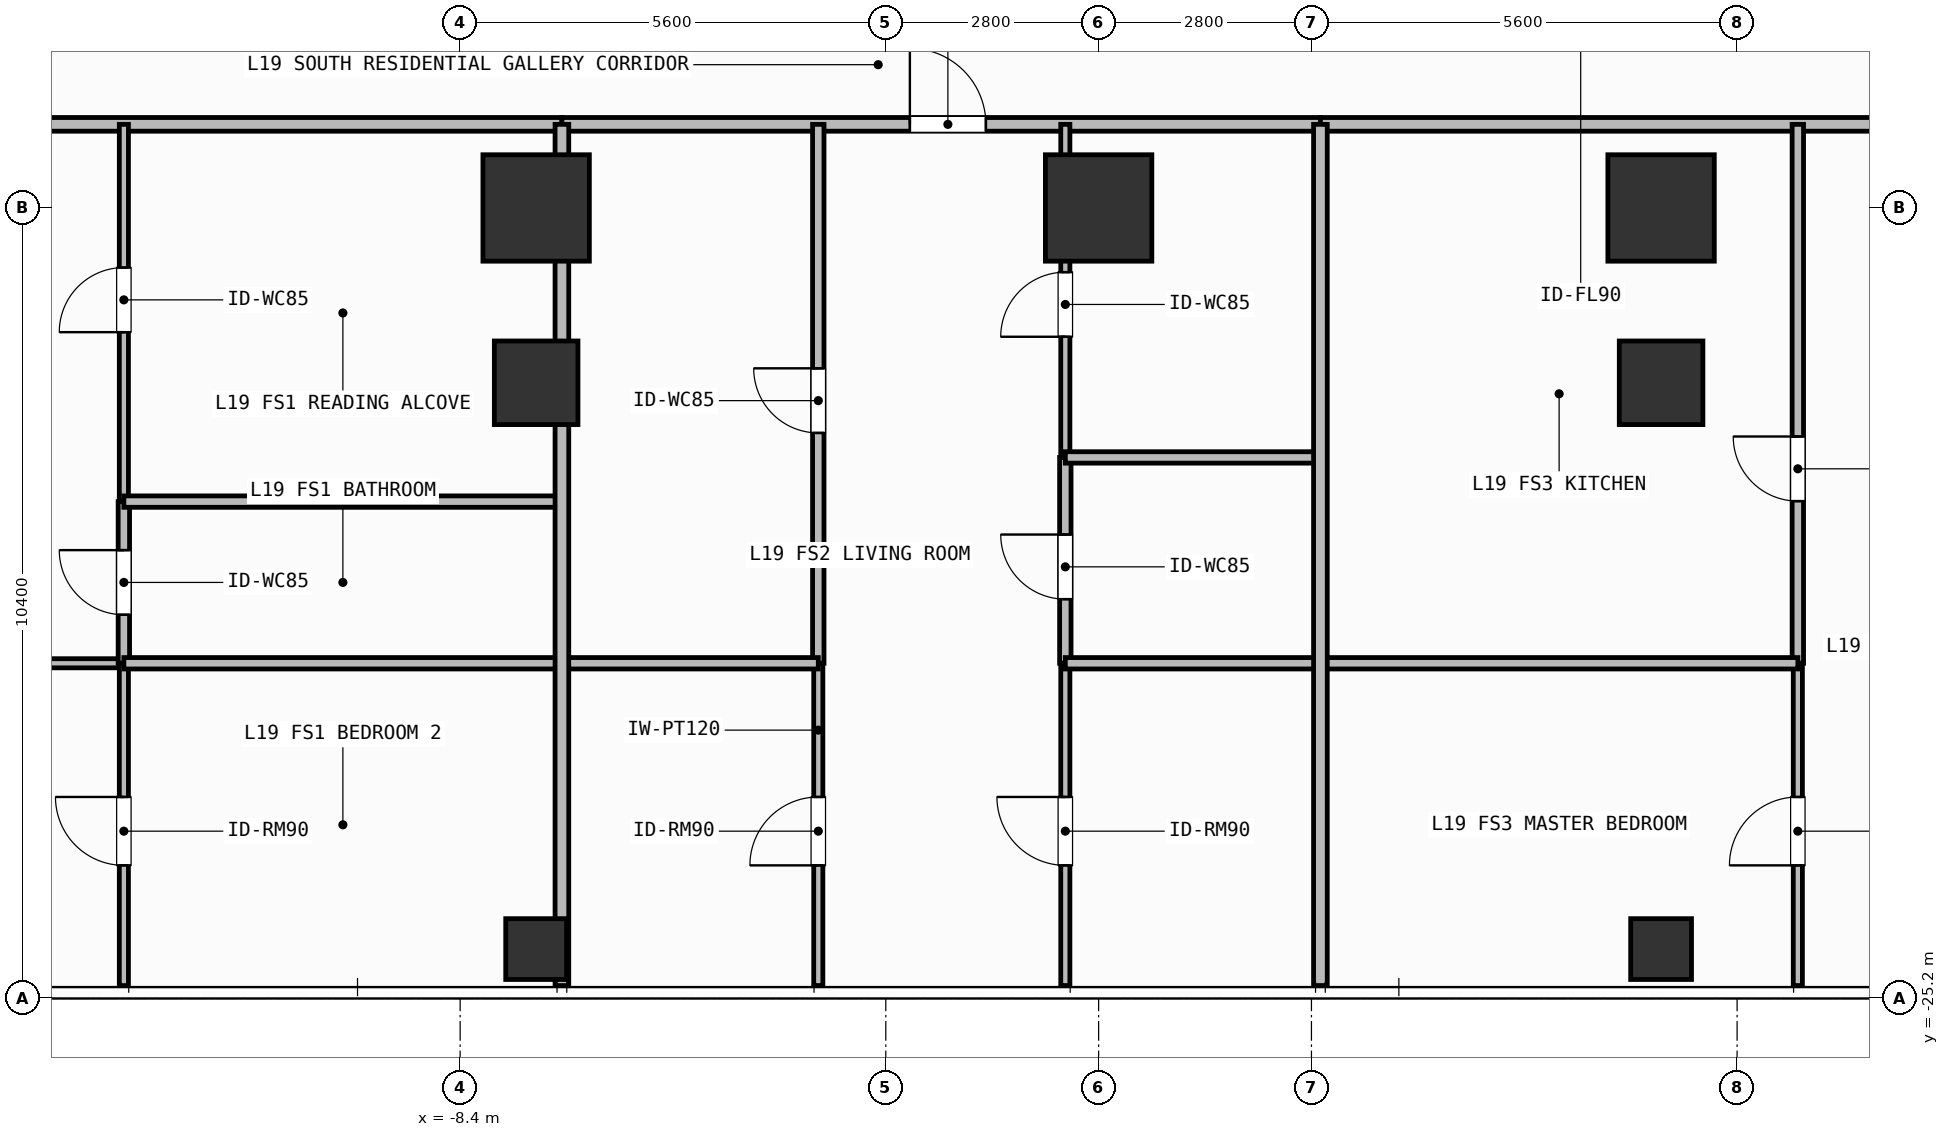
"""IFC4 building model, lengths in metres.
Left out: names, types, materials, properties, quantities, classifications, styles, units other than length and angle.
Written with IfcOpenShell. Run it as: python <this file> out.ifc"""

import sys

from ifc_helpers import new_model, si_unit, direction, frame, frame_2d, origin, origin_2d, place, context, subcontext, project, spatial, rectangle, hollow_rectangle, extrude, element, fill, save


model = new_model("IFC4")
c1 = context("Model", 3, precision=1e-05, world=origin(), true_north=direction((0.0, 1.0)))
c2 = subcontext(c1, "Body", "Model", "MODEL_VIEW")
j1 = project(units=[si_unit("LENGTHUNIT", "METRE"), si_unit("PLANEANGLEUNIT", "RADIAN")], contexts=[c1])
p1 = place(None, origin())
s1 = spatial("IfcSite", under=j1, at=p1, CompositionType="ELEMENT")
p2 = place(p1, origin())
s2 = spatial("IfcBuilding", under=s1, at=p2, CompositionType="ELEMENT")
p3 = place(p2, frame((0.0, 0.0, 73.5)))
s3 = spatial("IfcBuildingStorey", under=s2, at=p3, CompositionType="ELEMENT", Elevation=73.5)
for number, where, z_axis, x_axis in (
    (1, (-7.4, -14.8, 0.0), (0.0, 0.0, 1.0), (1.0, 0.0, 0.0)),
    (2, (0.0, -14.8, 0.0), (0.0, 0.0, 1.0), (1.0, 0.0, 0.0)),
    (3, (7.4, -14.8, 0.0), (0.0, 0.0, 1.0), (1.0, 0.0, 0.0)),
):
    element("IfcColumn", number, at=place(p3, frame(where, z_axis=z_axis, x_axis=x_axis)), inside=s3, PredefinedType="COLUMN", context=c2, shape_type="SweptSolid", body=[
        extrude(rectangle(XDim=1.4, YDim=1.4, at=origin_2d()), origin(), (0.0, 0.0, 1.0), 3.9),
    ])
for number, where, z_axis, x_axis in (
    (4, (-7.4, -17.1, 0.0), (0.0, 0.0, 1.0), (1.0, 0.0, 0.0)),
    (5, (7.4, -17.1, 0.0), (0.0, 0.0, 1.0), (1.0, 0.0, 0.0)),
):
    element("IfcColumn", number, at=place(p3, frame(where, z_axis=z_axis, x_axis=x_axis)), inside=s3, PredefinedType="COLUMN", context=c2, shape_type="SweptSolid", body=[
        extrude(rectangle(XDim=1.1, YDim=1.1, at=origin_2d()), origin(), (0.0, 0.0, 1.0), 3.9),
    ])
for number, where, z_axis, x_axis in (
    (6, (-7.4, -24.55, 0.0), (0.0, 0.0, 1.0), (1.0, 0.0, 0.0)),
    (7, (7.4, -24.55, 0.0), (0.0, 0.0, 1.0), (1.0, 0.0, 0.0)),
):
    element("IfcColumn", number, at=place(p3, frame(where, z_axis=z_axis, x_axis=x_axis)), inside=s3, PredefinedType="COLUMN", context=c2, shape_type="SweptSolid", body=[
        extrude(hollow_rectangle(XDim=0.8, YDim=0.8, WallThickness=0.036, at=origin_2d()), origin(), (0.0, 0.0, 1.0), 3.9),
    ])
p4 = place(p3, frame((-24.42, -13.7, 0.0), z_axis=(0.0, 0.0, 1.0), x_axis=(1.0, 0.0, 0.0)))
e8 = element("IfcWall", 8, at=p4, inside=s3, PredefinedType="PARTITIONING", context=c2, shape_type="SweptSolid", body=[
    extrude(rectangle(XDim=17.359, YDim=0.18, at=frame_2d((8.679, 0.0))), origin(), (0.0, 0.0, 1.0), 3.6),
])
p5 = place(p4, frame((7.288, 0.0, 0.0)))
e9 = element("IfcOpeningElement", 9, at=p5, cuts=e8, PredefinedType="OPENING", context=c2, shape_type="SweptSolid", body=[
    extrude(rectangle(XDim=1.0, YDim=2.2, at=frame_2d((0.5, 1.1))), frame((0.0, 0.1, 0.0), z_axis=(0.0, -1.0, 0.0), x_axis=(1.0, 0.0, 0.0)), (0.0, 0.0, 1.0), 0.2),
])
p6 = place(p3, frame((-20.783, -20.79, 0.0), z_axis=(0.0, 0.0, 1.0), x_axis=(1.0, 0.0, 0.0)))
e10 = element("IfcWall", 10, at=p6, inside=s3, PredefinedType="PARTITIONING", context=c2, shape_type="SweptSolid", body=[
    extrude(rectangle(XDim=7.959, YDim=0.12, at=frame_2d((3.979, 0.0))), origin(), (0.0, 0.0, 1.0), 3.6),
])
p7 = place(p6, frame((3.53, 0.0, 0.0)))
e11 = element("IfcOpeningElement", 11, at=p7, cuts=e10, PredefinedType="OPENING", context=c2, shape_type="SweptSolid", body=[
    extrude(rectangle(XDim=0.9, YDim=2.1, at=frame_2d((0.45, 1.05))), frame((0.0, 0.07, 0.0), z_axis=(0.0, -1.0, 0.0), x_axis=(1.0, 0.0, 0.0)), (0.0, 0.0, 1.0), 0.14),
])
p8 = place(p3, frame((-12.824, -20.79, 0.0), z_axis=(0.0, 0.0, 1.0), x_axis=(0.0, 1.0, 0.0)))
e12 = element("IfcWall", 12, at=p8, inside=s3, PredefinedType="PARTITIONING", context=c2, shape_type="SweptSolid", body=[
    extrude(rectangle(XDim=2.127, YDim=0.15, at=frame_2d((1.063, 0.0))), origin(), (0.0, 0.0, 1.0), 3.6),
])
p9 = place(p8, frame((0.638, 0.0, 0.0)))
e13 = element("IfcOpeningElement", 13, at=p9, cuts=e12, PredefinedType="OPENING", context=c2, shape_type="SweptSolid", body=[
    extrude(rectangle(XDim=0.85, YDim=2.1, at=frame_2d((0.425, 1.05))), frame((0.0, 0.085, 0.0), z_axis=(0.0, -1.0, 0.0), x_axis=(1.0, 0.0, 0.0)), (0.0, 0.0, 1.0), 0.17),
])
p10 = place(p3, frame((-12.824, -18.663, 0.0), z_axis=(0.0, 0.0, 1.0), x_axis=(0.0, 1.0, 0.0)))
e14 = element("IfcWall", 14, at=p10, inside=s3, PredefinedType="PARTITIONING", context=c2, shape_type="SweptSolid", body=[
    extrude(rectangle(XDim=4.963, YDim=0.12, at=frame_2d((2.481, 0.0))), origin(), (0.0, 0.0, 1.0), 3.6),
])
p11 = place(p10, frame((2.229, 0.0, 0.0)))
e15 = element("IfcOpeningElement", 15, at=p11, cuts=e14, PredefinedType="OPENING", context=c2, shape_type="SweptSolid", body=[
    extrude(rectangle(XDim=0.85, YDim=2.1, at=frame_2d((0.425, 1.05))), frame((0.0, 0.07, 0.0), z_axis=(0.0, -1.0, 0.0), x_axis=(1.0, 0.0, 0.0)), (0.0, 0.0, 1.0), 0.14),
])
p12 = place(p3, frame((-12.824, -25.03, 0.0), z_axis=(0.0, 0.0, 1.0), x_axis=(0.0, 1.0, 0.0)))
e16 = element("IfcWall", 16, at=p12, inside=s3, PredefinedType="PARTITIONING", context=c2, shape_type="SweptSolid", body=[
    extrude(rectangle(XDim=4.24, YDim=0.12, at=frame_2d((2.12, 0.0))), origin(), (0.0, 0.0, 1.0), 3.6),
])
p13 = place(p12, frame((1.581, 0.0, 0.0)))
e17 = element("IfcOpeningElement", 17, at=p13, cuts=e16, PredefinedType="OPENING", context=c2, shape_type="SweptSolid", body=[
    extrude(rectangle(XDim=0.9, YDim=2.1, at=frame_2d((0.45, 1.05))), frame((0.0, 0.07, 0.0), z_axis=(0.0, -1.0, 0.0), x_axis=(1.0, 0.0, 0.0)), (0.0, 0.0, 1.0), 0.14),
])
p14 = place(p3, frame((-7.061, -13.7, 0.0), z_axis=(0.0, 0.0, 1.0), x_axis=(1.0, 0.0, 0.0)))
e18 = element("IfcWall", 18, at=p14, inside=s3, PredefinedType="PARTITIONING", context=c2, shape_type="SweptSolid", body=[
    extrude(rectangle(XDim=9.979, YDim=0.18, at=frame_2d((4.99, 0.0))), origin(), (0.0, 0.0, 1.0), 3.6),
])
p15 = place(p14, frame((4.578, 0.0, 0.0)))
e19 = element("IfcOpeningElement", 19, at=p15, cuts=e18, PredefinedType="OPENING", context=c2, shape_type="SweptSolid", body=[
    extrude(rectangle(XDim=1.0, YDim=2.2, at=frame_2d((0.5, 1.1))), frame((0.0, 0.1, 0.0), z_axis=(0.0, -1.0, 0.0), x_axis=(1.0, 0.0, 0.0)), (0.0, 0.0, 1.0), 0.2),
])
p16 = place(p3, frame((-3.688, -20.79, 0.0), z_axis=(0.0, 0.0, 1.0), x_axis=(0.0, 1.0, 0.0)))
e20 = element("IfcWall", 20, at=p16, inside=s3, PredefinedType="PARTITIONING", context=c2, shape_type="SweptSolid", body=[
    extrude(rectangle(XDim=7.09, YDim=0.15, at=frame_2d((3.545, 0.0))), origin(), (0.0, 0.0, 1.0), 3.6),
])
p17 = place(p16, frame((3.03, 0.0, 0.0)))
e21 = element("IfcOpeningElement", 21, at=p17, cuts=e20, PredefinedType="OPENING", context=c2, shape_type="SweptSolid", body=[
    extrude(rectangle(XDim=0.85, YDim=2.1, at=frame_2d((0.425, 1.05))), frame((0.0, 0.085, 0.0), z_axis=(0.0, -1.0, 0.0), x_axis=(1.0, 0.0, 0.0)), (0.0, 0.0, 1.0), 0.17),
])
p18 = place(p3, frame((-3.688, -25.03, 0.0), z_axis=(0.0, 0.0, 1.0), x_axis=(0.0, 1.0, 0.0)))
e22 = element("IfcWall", 22, at=p18, inside=s3, PredefinedType="PARTITIONING", context=c2, shape_type="SweptSolid", body=[
    extrude(rectangle(XDim=4.24, YDim=0.12, at=frame_2d((2.12, 0.0))), origin(), (0.0, 0.0, 1.0), 3.6),
])
p19 = place(p18, frame((1.581, 0.0, 0.0)))
e23 = element("IfcOpeningElement", 23, at=p19, cuts=e22, PredefinedType="OPENING", context=c2, shape_type="SweptSolid", body=[
    extrude(rectangle(XDim=0.9, YDim=2.1, at=frame_2d((0.45, 1.05))), frame((0.0, 0.07, 0.0), z_axis=(0.0, -1.0, 0.0), x_axis=(1.0, 0.0, 0.0)), (0.0, 0.0, 1.0), 0.14),
])
p20 = place(p3, frame((-0.438, -20.79, 0.0), z_axis=(0.0, 0.0, 1.0), x_axis=(0.0, 1.0, 0.0)))
e24 = element("IfcWall", 24, at=p20, inside=s3, PredefinedType="PARTITIONING", context=c2, shape_type="SweptSolid", body=[
    extrude(rectangle(XDim=2.708, YDim=0.15, at=frame_2d((1.354, 0.0))), origin(), (0.0, 0.0, 1.0), 3.6),
])
p21 = place(p20, frame((0.844, 0.0, 0.0)))
e25 = element("IfcOpeningElement", 25, at=p21, cuts=e24, PredefinedType="OPENING", context=c2, shape_type="SweptSolid", body=[
    extrude(rectangle(XDim=0.85, YDim=2.1, at=frame_2d((0.425, 1.05))), frame((0.0, 0.085, 0.0), z_axis=(0.0, -1.0, 0.0), x_axis=(1.0, 0.0, 0.0)), (0.0, 0.0, 1.0), 0.17),
])
p22 = place(p3, frame((-0.438, -18.082, 0.0), z_axis=(0.0, 0.0, 1.0), x_axis=(0.0, 1.0, 0.0)))
e26 = element("IfcWall", 26, at=p22, inside=s3, PredefinedType="PARTITIONING", context=c2, shape_type="SweptSolid", body=[
    extrude(rectangle(XDim=4.382, YDim=0.12, at=frame_2d((2.191, 0.0))), origin(), (0.0, 0.0, 1.0), 3.6),
])
p23 = place(p22, frame((1.588, 0.0, 0.0)))
e27 = element("IfcOpeningElement", 27, at=p23, cuts=e26, PredefinedType="OPENING", context=c2, shape_type="SweptSolid", body=[
    extrude(rectangle(XDim=0.85, YDim=2.1, at=frame_2d((0.425, 1.05))), frame((0.0, 0.07, 0.0), z_axis=(0.0, -1.0, 0.0), x_axis=(1.0, 0.0, 0.0)), (0.0, 0.0, 1.0), 0.14),
])
p24 = place(p3, frame((-0.438, -25.03, 0.0), z_axis=(0.0, 0.0, 1.0), x_axis=(0.0, 1.0, 0.0)))
e28 = element("IfcWall", 28, at=p24, inside=s3, PredefinedType="PARTITIONING", context=c2, shape_type="SweptSolid", body=[
    extrude(rectangle(XDim=4.24, YDim=0.12, at=frame_2d((2.12, 0.0))), origin(), (0.0, 0.0, 1.0), 3.6),
])
p25 = place(p24, frame((1.581, 0.0, 0.0)))
e29 = element("IfcOpeningElement", 29, at=p25, cuts=e28, PredefinedType="OPENING", context=c2, shape_type="SweptSolid", body=[
    extrude(rectangle(XDim=0.9, YDim=2.1, at=frame_2d((0.45, 1.05))), frame((0.0, 0.07, 0.0), z_axis=(0.0, -1.0, 0.0), x_axis=(1.0, 0.0, 0.0)), (0.0, 0.0, 1.0), 0.14),
])
p26 = place(p3, frame((2.918, -13.7, 0.0), z_axis=(0.0, 0.0, 1.0), x_axis=(1.0, 0.0, 0.0)))
e30 = element("IfcWall", 30, at=p26, inside=s3, PredefinedType="PARTITIONING", context=c2, shape_type="SweptSolid", body=[
    extrude(rectangle(XDim=15.702, YDim=0.18, at=frame_2d((7.851, 0.0))), origin(), (0.0, 0.0, 1.0), 3.6),
])
p27 = place(p26, frame((7.531, 0.0, 0.0)))
e31 = element("IfcOpeningElement", 31, at=p27, cuts=e30, PredefinedType="OPENING", context=c2, shape_type="SweptSolid", body=[
    extrude(rectangle(XDim=1.0, YDim=2.2, at=frame_2d((0.5, 1.1))), frame((0.0, 0.1, 0.0), z_axis=(0.0, -1.0, 0.0), x_axis=(1.0, 0.0, 0.0)), (0.0, 0.0, 1.0), 0.2),
])
p28 = place(p3, frame((9.199, -20.79, 0.0), z_axis=(0.0, 0.0, 1.0), x_axis=(0.0, 1.0, 0.0)))
e32 = element("IfcWall", 32, at=p28, inside=s3, PredefinedType="PARTITIONING", context=c2, shape_type="SweptSolid", body=[
    extrude(rectangle(XDim=7.09, YDim=0.15, at=frame_2d((3.545, 0.0))), origin(), (0.0, 0.0, 1.0), 3.6),
])
p29 = place(p28, frame((2.133, 0.0, 0.0)))
e33 = element("IfcOpeningElement", 33, at=p29, cuts=e32, PredefinedType="OPENING", context=c2, shape_type="SweptSolid", body=[
    extrude(rectangle(XDim=0.85, YDim=2.1, at=frame_2d((0.425, 1.05))), frame((0.0, 0.085, 0.0), z_axis=(0.0, -1.0, 0.0), x_axis=(1.0, 0.0, 0.0)), (0.0, 0.0, 1.0), 0.17),
])
p30 = place(p3, frame((9.199, -25.03, 0.0), z_axis=(0.0, 0.0, 1.0), x_axis=(0.0, 1.0, 0.0)))
e34 = element("IfcWall", 34, at=p30, inside=s3, PredefinedType="PARTITIONING", context=c2, shape_type="SweptSolid", body=[
    extrude(rectangle(XDim=4.24, YDim=0.12, at=frame_2d((2.12, 0.0))), origin(), (0.0, 0.0, 1.0), 3.6),
])
p31 = place(p30, frame((1.581, 0.0, 0.0)))
e35 = element("IfcOpeningElement", 35, at=p31, cuts=e34, PredefinedType="OPENING", context=c2, shape_type="SweptSolid", body=[
    extrude(rectangle(XDim=0.9, YDim=2.1, at=frame_2d((0.45, 1.05))), frame((0.0, 0.07, 0.0), z_axis=(0.0, -1.0, 0.0), x_axis=(1.0, 0.0, 0.0)), (0.0, 0.0, 1.0), 0.14),
])
for number, where, z_axis, x_axis in (
    (36, (-12.824, -18.663, 0.0), (0.0, 0.0, 1.0), (1.0, 0.0, 0.0)),
    (37, (-12.824, -20.79, 0.0), (0.0, 0.0, 1.0), (1.0, 0.0, 0.0)),
):
    element("IfcWall", number, at=place(p3, frame(where, z_axis=z_axis, x_axis=x_axis)), inside=s3, PredefinedType="PARTITIONING", context=c2, shape_type="SweptSolid", body=[
        extrude(rectangle(XDim=5.763, YDim=0.15, at=frame_2d((2.881, 0.0))), origin(), (0.0, 0.0, 1.0), 3.6),
    ])
p32 = place(p3, frame((-7.061, -20.79, 0.0), z_axis=(0.0, 0.0, 1.0), x_axis=(1.0, 0.0, 0.0)))
e38 = element("IfcWall", 38, at=p32, inside=s3, PredefinedType="PARTITIONING", context=c2, shape_type="SweptSolid", body=[
    extrude(rectangle(XDim=3.373, YDim=0.15, at=frame_2d((1.687, 0.0))), origin(), (0.0, 0.0, 1.0), 3.6),
])
for number, where, z_axis, x_axis in (
    (39, (-0.438, -18.082, 0.0), (0.0, 0.0, 1.0), (1.0, 0.0, 0.0)),
    (40, (-0.438, -20.79, 0.0), (0.0, 0.0, 1.0), (1.0, 0.0, 0.0)),
):
    element("IfcWall", number, at=place(p3, frame(where, z_axis=z_axis, x_axis=x_axis)), inside=s3, PredefinedType="PARTITIONING", context=c2, shape_type="SweptSolid", body=[
        extrude(rectangle(XDim=3.356, YDim=0.15, at=frame_2d((1.678, 0.0))), origin(), (0.0, 0.0, 1.0), 3.6),
    ])
p33 = place(p3, frame((-7.061, -25.03, 0.0), z_axis=(0.0, 0.0, 1.0), x_axis=(0.0, 1.0, 0.0)))
e41 = element("IfcWall", 41, at=p33, inside=s3, PredefinedType="PARTITIONING", context=c2, shape_type="SweptSolid", body=[
    extrude(rectangle(XDim=11.33, YDim=0.18, at=frame_2d((5.665, 0.0))), origin(), (0.0, 0.0, 1.0), 3.6),
])
p34 = place(p3, frame((2.918, -20.79, 0.0), z_axis=(0.0, 0.0, 1.0), x_axis=(1.0, 0.0, 0.0)))
e42 = element("IfcWall", 42, at=p34, inside=s3, PredefinedType="PARTITIONING", context=c2, shape_type="SweptSolid", body=[
    extrude(rectangle(XDim=6.281, YDim=0.15, at=frame_2d((3.141, 0.0))), origin(), (0.0, 0.0, 1.0), 3.6),
])
p35 = place(p3, frame((2.918, -25.03, 0.0), z_axis=(0.0, 0.0, 1.0), x_axis=(0.0, 1.0, 0.0)))
e43 = element("IfcWall", 43, at=p35, inside=s3, PredefinedType="PARTITIONING", context=c2, shape_type="SweptSolid", body=[
    extrude(rectangle(XDim=11.33, YDim=0.18, at=frame_2d((5.665, 0.0))), origin(), (0.0, 0.0, 1.0), 3.6),
])
p36 = place(p9, origin())
e44 = element("IfcDoor", 44, at=p36, inside=s3, OperationType="SINGLE_SWING_RIGHT", PredefinedType="DOOR", context=c2, shape_type="SweptSolid", body=[
    extrude(rectangle(XDim=0.85, YDim=2.1, at=frame_2d((0.425, 1.05))), frame((0.0, 0.025, 0.0), z_axis=(0.0, -1.0, 0.0), x_axis=(1.0, 0.0, 0.0)), (0.0, 0.0, 1.0), 0.05),
])
fill(e13, e44)
p37 = place(p11, origin())
e45 = element("IfcDoor", 45, at=p37, inside=s3, OperationType="SINGLE_SWING_LEFT", PredefinedType="DOOR", context=c2, shape_type="SweptSolid", body=[
    extrude(rectangle(XDim=0.85, YDim=2.1, at=frame_2d((0.425, 1.05))), frame((0.0, 0.025, 0.0), z_axis=(0.0, -1.0, 0.0), x_axis=(1.0, 0.0, 0.0)), (0.0, 0.0, 1.0), 0.05),
])
fill(e15, e45)
p38 = place(p13, origin())
e46 = element("IfcDoor", 46, at=p38, inside=s3, OperationType="SINGLE_SWING_RIGHT", PredefinedType="DOOR", context=c2, shape_type="SweptSolid", body=[
    extrude(rectangle(XDim=0.9, YDim=2.1, at=frame_2d((0.45, 1.05))), frame((0.0, 0.025, 0.0), z_axis=(0.0, -1.0, 0.0), x_axis=(1.0, 0.0, 0.0)), (0.0, 0.0, 1.0), 0.05),
])
fill(e17, e46)
p39 = place(p15, origin())
e47 = element("IfcDoor", 47, at=p39, inside=s3, OperationType="SINGLE_SWING_LEFT", PredefinedType="DOOR", context=c2, shape_type="SweptSolid", body=[
    extrude(rectangle(XDim=1.0, YDim=2.2, at=frame_2d((0.5, 1.1))), frame((0.0, 0.025, 0.0), z_axis=(0.0, -1.0, 0.0), x_axis=(1.0, 0.0, 0.0)), (0.0, 0.0, 1.0), 0.05),
])
fill(e19, e47)
p40 = place(p17, origin())
e48 = element("IfcDoor", 48, at=p40, inside=s3, OperationType="SINGLE_SWING_RIGHT", PredefinedType="DOOR", context=c2, shape_type="SweptSolid", body=[
    extrude(rectangle(XDim=0.85, YDim=2.1, at=frame_2d((0.425, 1.05))), frame((0.0, 0.025, 0.0), z_axis=(0.0, -1.0, 0.0), x_axis=(1.0, 0.0, 0.0)), (0.0, 0.0, 1.0), 0.05),
])
fill(e21, e48)
p41 = place(p19, origin())
e49 = element("IfcDoor", 49, at=p41, inside=s3, OperationType="SINGLE_SWING_LEFT", PredefinedType="DOOR", context=c2, shape_type="SweptSolid", body=[
    extrude(rectangle(XDim=0.9, YDim=2.1, at=frame_2d((0.45, 1.05))), frame((0.0, 0.025, 0.0), z_axis=(0.0, -1.0, 0.0), x_axis=(1.0, 0.0, 0.0)), (0.0, 0.0, 1.0), 0.05),
])
fill(e23, e49)
p42 = place(p21, origin())
e50 = element("IfcDoor", 50, at=p42, inside=s3, OperationType="SINGLE_SWING_RIGHT", PredefinedType="DOOR", context=c2, shape_type="SweptSolid", body=[
    extrude(rectangle(XDim=0.85, YDim=2.1, at=frame_2d((0.425, 1.05))), frame((0.0, 0.025, 0.0), z_axis=(0.0, -1.0, 0.0), x_axis=(1.0, 0.0, 0.0)), (0.0, 0.0, 1.0), 0.05),
])
fill(e25, e50)
p43 = place(p23, origin())
e51 = element("IfcDoor", 51, at=p43, inside=s3, OperationType="SINGLE_SWING_LEFT", PredefinedType="DOOR", context=c2, shape_type="SweptSolid", body=[
    extrude(rectangle(XDim=0.85, YDim=2.1, at=frame_2d((0.425, 1.05))), frame((0.0, 0.025, 0.0), z_axis=(0.0, -1.0, 0.0), x_axis=(1.0, 0.0, 0.0)), (0.0, 0.0, 1.0), 0.05),
])
fill(e27, e51)
p44 = place(p25, origin())
e52 = element("IfcDoor", 52, at=p44, inside=s3, OperationType="SINGLE_SWING_RIGHT", PredefinedType="DOOR", context=c2, shape_type="SweptSolid", body=[
    extrude(rectangle(XDim=0.9, YDim=2.1, at=frame_2d((0.45, 1.05))), frame((0.0, 0.025, 0.0), z_axis=(0.0, -1.0, 0.0), x_axis=(1.0, 0.0, 0.0)), (0.0, 0.0, 1.0), 0.05),
])
fill(e29, e52)
p45 = place(p29, origin())
e53 = element("IfcDoor", 53, at=p45, inside=s3, OperationType="SINGLE_SWING_RIGHT", PredefinedType="DOOR", context=c2, shape_type="SweptSolid", body=[
    extrude(rectangle(XDim=0.85, YDim=2.1, at=frame_2d((0.425, 1.05))), frame((0.0, 0.025, 0.0), z_axis=(0.0, -1.0, 0.0), x_axis=(1.0, 0.0, 0.0)), (0.0, 0.0, 1.0), 0.05),
])
fill(e33, e53)
p46 = place(p31, origin())
e54 = element("IfcDoor", 54, at=p46, inside=s3, OperationType="SINGLE_SWING_LEFT", PredefinedType="DOOR", context=c2, shape_type="SweptSolid", body=[
    extrude(rectangle(XDim=0.9, YDim=2.1, at=frame_2d((0.45, 1.05))), frame((0.0, 0.025, 0.0), z_axis=(0.0, -1.0, 0.0), x_axis=(1.0, 0.0, 0.0)), (0.0, 0.0, 1.0), 0.05),
])
fill(e35, e54)
save(model, sys.argv[1])
